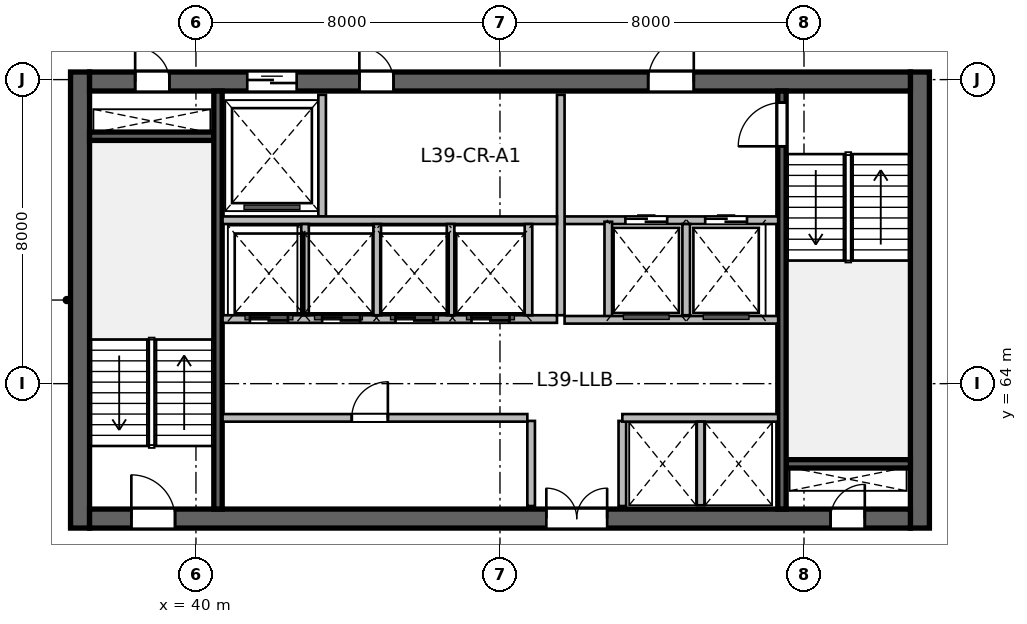
"""IFC4 building model, lengths in metres.
Left out: names, types, materials, properties, quantities, classifications, styles, units other than length and angle.
Written with IfcOpenShell. Run it as: python <this file> out.ifc"""

import sys

from ifc_helpers import new_model, si_unit, direction, frame, frame_2d, origin, place, context, subcontext, project, spatial, rectangle, extrude, source, transform, mapped, element, fill, save


model = new_model("IFC4")
c1 = context("Model", 3, precision=1e-05, world=origin(), true_north=direction((0.0, 1.0)))
c2 = subcontext(c1, "Body", "Model", "MODEL_VIEW")
j1 = project(units=[si_unit("LENGTHUNIT", "METRE"), si_unit("PLANEANGLEUNIT", "RADIAN")], contexts=[c1])
p1 = place(None, origin())
s1 = spatial("IfcSite", under=j1, at=p1, CompositionType="ELEMENT")
p2 = place(p1, origin())
s2 = spatial("IfcBuilding", under=s1, at=p2, CompositionType="ELEMENT")
p3 = place(p2, frame((0.0, 0.0, 162.3)))
s3 = spatial("IfcBuildingStorey", under=s2, at=p3, CompositionType="ELEMENT", Elevation=162.3)
m1 = source(origin(), c2, "Body", "SweptSolid", [
    extrude(rectangle(XDim=12.0, YDim=0.5, at=frame_2d((6.0, 0.0))), origin(), (0.0, 0.0, 1.0), 3.9),
])
for number, where, z_axis, x_axis in (
    (1, (36.95, 60.2, 0.0), (0.0, 0.0, 1.0), (0.0, 1.0, 0.0)),
    (2, (59.05, 60.2, 0.0), (0.0, 0.0, 1.0), (0.0, 1.0, 0.0)),
):
    element("IfcWall", number, at=place(p3, frame(where, z_axis=z_axis, x_axis=x_axis)), inside=s3, PredefinedType="SHEAR", context=c2, shape_type="MappedRepresentation", body=[
        mapped(m1, transform((0.0, 0.0, 0.0), scale=1.0)),
    ])
m2 = source(origin(), c2, "Body", "SweptSolid", [
    extrude(rectangle(XDim=21.6, YDim=0.5, at=frame_2d((10.8, 0.0))), origin(), (0.0, 0.0, 1.0), 3.9),
])
p4 = place(p3, frame((37.2, 60.45, 0.0), z_axis=(0.0, 0.0, 1.0), x_axis=(1.0, 0.0, 0.0)))
e3 = element("IfcWall", 3, at=p4, inside=s3, PredefinedType="SHEAR", context=c2, shape_type="MappedRepresentation", body=[
    mapped(m2, transform((0.0, 0.0, 0.0), scale=1.0)),
])
p5 = place(p4, frame((1.1, 0.0, 0.0)))
e4 = element("IfcOpeningElement", 4, at=p5, cuts=e3, PredefinedType="OPENING", context=c2, shape_type="SweptSolid", body=[
    extrude(rectangle(XDim=1.15, YDim=2.15, at=frame_2d((0.575, 1.075))), frame((0.0, 0.26, 0.0), z_axis=(0.0, -1.0, 0.0), x_axis=(1.0, 0.0, 0.0)), (0.0, 0.0, 1.0), 0.52),
])
p6 = place(p4, frame((19.5, 0.0, 0.0)))
e5 = element("IfcOpeningElement", 5, at=p6, cuts=e3, PredefinedType="OPENING", context=c2, shape_type="SweptSolid", body=[
    extrude(rectangle(XDim=0.9, YDim=2.1, at=frame_2d((0.45, 1.05))), frame((0.0, 0.26, 0.0), z_axis=(0.0, -1.0, 0.0), x_axis=(1.0, 0.0, 0.0)), (0.0, 0.0, 1.0), 0.52),
])
p7 = place(p4, frame((12.02, 0.0, 0.0)))
e6 = element("IfcOpeningElement", 6, at=p7, cuts=e3, PredefinedType="OPENING", context=c2, shape_type="SweptSolid", body=[
    extrude(rectangle(XDim=1.6, YDim=2.15, at=frame_2d((0.8, 1.075))), frame((0.0, 0.26, 0.0), z_axis=(0.0, -1.0, 0.0), x_axis=(1.0, 0.0, 0.0)), (0.0, 0.0, 1.0), 0.52),
])
p8 = place(p3, frame((37.2, 71.95, 0.0), z_axis=(0.0, 0.0, 1.0), x_axis=(1.0, 0.0, 0.0)))
e7 = element("IfcWall", 7, at=p8, inside=s3, PredefinedType="SHEAR", context=c2, shape_type="MappedRepresentation", body=[
    mapped(m2, transform((0.0, 0.0, 0.0), scale=1.0)),
])
p9 = place(p8, frame((1.2, 0.0, 0.0)))
e8 = element("IfcOpeningElement", 8, at=p9, cuts=e7, PredefinedType="OPENING", context=c2, shape_type="SweptSolid", body=[
    extrude(rectangle(XDim=0.9, YDim=2.1, at=frame_2d((0.45, 1.05))), frame((0.0, 0.26, 0.0), z_axis=(0.0, -1.0, 0.0), x_axis=(1.0, 0.0, 0.0)), (0.0, 0.0, 1.0), 0.52),
])
p10 = place(p8, frame((14.7, 0.0, 0.0)))
e9 = element("IfcOpeningElement", 9, at=p10, cuts=e7, PredefinedType="OPENING", context=c2, shape_type="SweptSolid", body=[
    extrude(rectangle(XDim=1.2, YDim=2.15, at=frame_2d((0.6, 1.075))), frame((0.0, 0.26, 0.0), z_axis=(0.0, -1.0, 0.0), x_axis=(1.0, 0.0, 0.0)), (0.0, 0.0, 1.0), 0.52),
])
p11 = place(p8, frame((4.15, 0.0, 0.0)))
e10 = element("IfcOpeningElement", 10, at=p11, cuts=e7, PredefinedType="OPENING", context=c2, shape_type="SweptSolid", body=[
    extrude(rectangle(XDim=1.3, YDim=2.15, at=frame_2d((0.65, 1.075))), frame((0.0, 0.26, 0.0), z_axis=(0.0, -1.0, 0.0), x_axis=(1.0, 0.0, 0.0)), (0.0, 0.0, 1.0), 0.52),
])
p12 = place(p8, frame((7.1, 0.0, 0.0)))
e11 = element("IfcOpeningElement", 11, at=p12, cuts=e7, PredefinedType="OPENING", context=c2, shape_type="SweptSolid", body=[
    extrude(rectangle(XDim=0.9, YDim=2.1, at=frame_2d((0.45, 1.05))), frame((0.0, 0.26, 0.0), z_axis=(0.0, -1.0, 0.0), x_axis=(1.0, 0.0, 0.0)), (0.0, 0.0, 1.0), 0.52),
])
m3 = source(origin(), c2, "Body", "SweptSolid", [
    extrude(rectangle(XDim=3.27, YDim=0.22, at=frame_2d((1.635, 0.0))), origin(), (0.0, 0.0, 1.0), 3.9),
])
for number, where, z_axis, x_axis in (
    (12, (37.2, 70.51, 0.0), (0.0, 0.0, 1.0), (1.0, 0.0, 0.0)),
    (13, (55.53, 61.89, 0.0), (0.0, 0.0, 1.0), (1.0, 0.0, 0.0)),
):
    element("IfcWall", number, at=place(p3, frame(where, z_axis=z_axis, x_axis=x_axis)), inside=s3, PredefinedType="SHEAR", context=c2, shape_type="MappedRepresentation", body=[
        mapped(m3, transform((0.0, 0.0, 0.0), scale=1.0)),
    ])
m4 = source(origin(), c2, "Body", "SweptSolid", [
    extrude(rectangle(XDim=11.0, YDim=0.22, at=frame_2d((5.5, 0.0))), origin(), (0.0, 0.0, 1.0), 3.9),
])
p13 = place(p3, frame((40.58, 60.7, 0.0), z_axis=(0.0, 0.0, 1.0), x_axis=(0.0, 1.0, 0.0)))
e14 = element("IfcWall", 14, at=p13, inside=s3, PredefinedType="SHEAR", context=c2, shape_type="MappedRepresentation", body=[
    mapped(m4, transform((0.0, 0.0, 0.0), scale=1.0)),
])
p14 = place(p3, frame((55.42, 60.7, 0.0), z_axis=(0.0, 0.0, 1.0), x_axis=(0.0, 1.0, 0.0)))
e15 = element("IfcWall", 15, at=p14, inside=s3, PredefinedType="SHEAR", context=c2, shape_type="MappedRepresentation", body=[
    mapped(m4, transform((0.0, 0.0, 0.0), scale=1.0)),
])
p15 = place(p14, frame((9.545, 0.0, 0.0)))
e16 = element("IfcOpeningElement", 16, at=p15, cuts=e15, PredefinedType="OPENING", context=c2, shape_type="SweptSolid", body=[
    extrude(rectangle(XDim=1.15, YDim=2.15, at=frame_2d((0.575, 1.075))), frame((0.0, 0.12, 0.0), z_axis=(0.0, -1.0, 0.0), x_axis=(1.0, 0.0, 0.0)), (0.0, 0.0, 1.0), 0.24),
])
m5 = source(origin(), c2, "Body", "SweptSolid", [
    extrude(rectangle(XDim=2.24, YDim=0.2, at=frame_2d((1.12, 0.0))), origin(), (0.0, 0.0, 1.0), 3.65),
])
for number, where, z_axis, x_axis in (
    (17, (48.82, 60.78, 0.0), (0.0, 0.0, 1.0), (0.0, 1.0, 0.0)),
    (18, (51.22, 60.78, 0.0), (0.0, 0.0, 1.0), (0.0, 1.0, 0.0)),
):
    element("IfcWall", number, at=place(p3, frame(where, z_axis=z_axis, x_axis=x_axis)), inside=s3, PredefinedType="SOLIDWALL", context=c2, shape_type="MappedRepresentation", body=[
        mapped(m5, transform((0.0, 0.0, 0.0), scale=1.0)),
    ])
m6 = source(origin(), c2, "Body", "SweptSolid", [
    extrude(rectangle(XDim=5.62, YDim=0.2, at=frame_2d((2.81, 0.0))), origin(), (0.0, 0.0, 1.0), 3.65),
])
p16 = place(p3, frame((49.7, 68.3, 0.0), z_axis=(0.0, 0.0, 1.0), x_axis=(1.0, 0.0, 0.0)))
e19 = element("IfcWall", 19, at=p16, inside=s3, PredefinedType="SOLIDWALL", context=c2, shape_type="MappedRepresentation", body=[
    mapped(m6, transform((0.0, 0.0, 0.0), scale=1.0)),
])
p17 = place(p16, frame((1.6, 0.0, 0.0)))
e20 = element("IfcOpeningElement", 20, at=p17, cuts=e19, PredefinedType="OPENING", context=c2, shape_type="SweptSolid", body=[
    extrude(rectangle(XDim=1.1, YDim=2.15, at=frame_2d((0.55, 1.075))), frame((0.0, 0.11, 0.0), z_axis=(0.0, -1.0, 0.0), x_axis=(1.0, 0.0, 0.0)), (0.0, 0.0, 1.0), 0.22),
])
p18 = place(p16, frame((3.7, 0.0, 0.0)))
e21 = element("IfcOpeningElement", 21, at=p18, cuts=e19, PredefinedType="OPENING", context=c2, shape_type="SweptSolid", body=[
    extrude(rectangle(XDim=1.1, YDim=2.15, at=frame_2d((0.55, 1.075))), frame((0.0, 0.11, 0.0), z_axis=(0.0, -1.0, 0.0), x_axis=(1.0, 0.0, 0.0)), (0.0, 0.0, 1.0), 0.22),
])
m7 = source(origin(), c2, "Body", "SweptSolid", [
    extrude(rectangle(XDim=5.8, YDim=0.2, at=frame_2d((2.9, 0.0))), origin(), (0.0, 0.0, 1.0), 3.65),
])
p19 = place(p3, frame((49.6, 65.8, 0.0), z_axis=(0.0, 0.0, 1.0), x_axis=(0.0, 1.0, 0.0)))
e22 = element("IfcWall", 22, at=p19, inside=s3, PredefinedType="SOLIDWALL", context=c2, shape_type="MappedRepresentation", body=[
    mapped(m7, transform((0.0, 0.0, 0.0), scale=1.0)),
])
m8 = source(origin(), c2, "Body", "SweptSolid", [
    extrude(rectangle(XDim=2.58, YDim=0.2, at=frame_2d((1.29, 0.0))), origin(), (0.0, 0.0, 1.0), 3.65),
])
p20 = place(p3, frame((50.85, 65.68, 0.0), z_axis=(0.0, 0.0, 1.0), x_axis=(0.0, 1.0, 0.0)))
e23 = element("IfcWall", 23, at=p20, inside=s3, PredefinedType="SOLIDWALL", context=c2, shape_type="MappedRepresentation", body=[
    mapped(m8, transform((0.0, 0.0, 0.0), scale=1.0)),
])
m9 = source(origin(), c2, "Body", "SweptSolid", [
    extrude(rectangle(XDim=2.4, YDim=0.2, at=frame_2d((1.2, 0.0))), origin(), (0.0, 0.0, 1.0), 3.65),
])
p21 = place(p3, frame((52.9, 65.8, 0.0), z_axis=(0.0, 0.0, 1.0), x_axis=(0.0, 1.0, 0.0)))
e24 = element("IfcWall", 24, at=p21, inside=s3, PredefinedType="SOLIDWALL", context=c2, shape_type="MappedRepresentation", body=[
    mapped(m9, transform((0.0, 0.0, 0.0), scale=1.0)),
])
p22 = place(p3, frame((49.7, 65.68, 0.0), z_axis=(0.0, 0.0, 1.0), x_axis=(1.0, 0.0, 0.0)))
e25 = element("IfcWall", 25, at=p22, inside=s3, PredefinedType="SOLIDWALL", context=c2, shape_type="MappedRepresentation", body=[
    mapped(m6, transform((0.0, 0.0, 0.0), scale=1.0)),
])
m10 = source(origin(), c2, "Body", "SweptSolid", [
    extrude(rectangle(XDim=3.2, YDim=0.2, at=frame_2d((1.6, 0.0))), origin(), (0.0, 0.0, 1.0), 3.65),
])
p23 = place(p3, frame((43.32, 68.4, 0.0), z_axis=(0.0, 0.0, 1.0), x_axis=(0.0, 1.0, 0.0)))
e26 = element("IfcWall", 26, at=p23, inside=s3, PredefinedType="SOLIDWALL", context=c2, shape_type="MappedRepresentation", body=[
    mapped(m10, transform((0.0, 0.0, 0.0), scale=1.0)),
])
m11 = source(origin(), c2, "Body", "SweptSolid", [
    extrude(rectangle(XDim=8.8, YDim=0.2, at=frame_2d((4.4, 0.0))), origin(), (0.0, 0.0, 1.0), 3.65),
])
p24 = place(p3, frame((40.7, 68.3, 0.0), z_axis=(0.0, 0.0, 1.0), x_axis=(1.0, 0.0, 0.0)))
e27 = element("IfcWall", 27, at=p24, inside=s3, PredefinedType="SOLIDWALL", context=c2, shape_type="MappedRepresentation", body=[
    mapped(m11, transform((0.0, 0.0, 0.0), scale=1.0)),
])
m12 = source(origin(), c2, "Body", "SweptSolid", [
    extrude(rectangle(XDim=8.02, YDim=0.2, at=frame_2d((4.01, 0.0))), origin(), (0.0, 0.0, 1.0), 3.65),
])
p25 = place(p3, frame((40.7, 63.1, 0.0), z_axis=(0.0, 0.0, 1.0), x_axis=(1.0, 0.0, 0.0)))
e28 = element("IfcWall", 28, at=p25, inside=s3, PredefinedType="SOLIDWALL", context=c2, shape_type="MappedRepresentation", body=[
    mapped(m12, transform((0.0, 0.0, 0.0), scale=1.0)),
])
p26 = place(p25, frame((3.4, 0.0, 0.0)))
e29 = element("IfcOpeningElement", 29, at=p26, cuts=e28, PredefinedType="OPENING", context=c2, shape_type="SweptSolid", body=[
    extrude(rectangle(XDim=0.95, YDim=2.15, at=frame_2d((0.475, 1.075))), frame((0.0, 0.11, 0.0), z_axis=(0.0, -1.0, 0.0), x_axis=(1.0, 0.0, 0.0)), (0.0, 0.0, 1.0), 0.22),
])
m13 = source(origin(), c2, "Body", "SweptSolid", [
    extrude(rectangle(XDim=4.1, YDim=0.2, at=frame_2d((2.05, 0.0))), origin(), (0.0, 0.0, 1.0), 3.65),
])
p27 = place(p3, frame((51.22, 63.1, 0.0), z_axis=(0.0, 0.0, 1.0), x_axis=(1.0, 0.0, 0.0)))
e30 = element("IfcWall", 30, at=p27, inside=s3, PredefinedType="SOLIDWALL", context=c2, shape_type="MappedRepresentation", body=[
    mapped(m13, transform((0.0, 0.0, 0.0), scale=1.0)),
])
m14 = source(origin(), c2, "Body", "SweptSolid", [
    extrude(rectangle(XDim=2.2, YDim=0.2, at=frame_2d((1.1, 0.0))), origin(), (0.0, 0.0, 1.0), 3.65),
])
p28 = place(p3, frame((53.28, 60.8, 0.0), z_axis=(0.0, 0.0, 1.0), x_axis=(0.0, 1.0, 0.0)))
e31 = element("IfcWall", 31, at=p28, inside=s3, PredefinedType="SOLIDWALL", context=c2, shape_type="MappedRepresentation", body=[
    mapped(m14, transform((0.0, 0.0, 0.0), scale=1.0)),
])
p29 = place(p3, frame((40.7, 65.7, 0.0), z_axis=(0.0, 0.0, 1.0), x_axis=(1.0, 0.0, 0.0)))
e32 = element("IfcWall", 32, at=p29, inside=s3, PredefinedType="SOLIDWALL", context=c2, shape_type="MappedRepresentation", body=[
    mapped(m11, transform((0.0, 0.0, 0.0), scale=1.0)),
])
p30 = place(p29, frame((0.72, 0.0, 0.0)))
e33 = element("IfcOpeningElement", 33, at=p30, cuts=e32, PredefinedType="OPENING", context=c2, shape_type="SweptSolid", body=[
    extrude(rectangle(XDim=1.0, YDim=2.15, at=frame_2d((0.5, 1.075))), frame((0.0, 0.11, 0.0), z_axis=(0.0, -1.0, 0.0), x_axis=(1.0, 0.0, 0.0)), (0.0, 0.0, 1.0), 0.22),
])
p31 = place(p29, frame((2.62, 0.0, 0.0)))
e34 = element("IfcOpeningElement", 34, at=p31, cuts=e32, PredefinedType="OPENING", context=c2, shape_type="SweptSolid", body=[
    extrude(rectangle(XDim=1.0, YDim=2.15, at=frame_2d((0.5, 1.075))), frame((0.0, 0.11, 0.0), z_axis=(0.0, -1.0, 0.0), x_axis=(1.0, 0.0, 0.0)), (0.0, 0.0, 1.0), 0.22),
])
p32 = place(p29, frame((4.55, 0.0, 0.0)))
e35 = element("IfcOpeningElement", 35, at=p32, cuts=e32, PredefinedType="OPENING", context=c2, shape_type="SweptSolid", body=[
    extrude(rectangle(XDim=1.0, YDim=2.15, at=frame_2d((0.5, 1.075))), frame((0.0, 0.11, 0.0), z_axis=(0.0, -1.0, 0.0), x_axis=(1.0, 0.0, 0.0)), (0.0, 0.0, 1.0), 0.22),
])
p33 = place(p29, frame((6.55, 0.0, 0.0)))
e36 = element("IfcOpeningElement", 36, at=p33, cuts=e32, PredefinedType="OPENING", context=c2, shape_type="SweptSolid", body=[
    extrude(rectangle(XDim=1.0, YDim=2.15, at=frame_2d((0.5, 1.075))), frame((0.0, 0.11, 0.0), z_axis=(0.0, -1.0, 0.0), x_axis=(1.0, 0.0, 0.0)), (0.0, 0.0, 1.0), 0.22),
])
for number, where, z_axis, x_axis in (
    (37, (48.75, 65.8, 0.0), (0.0, 0.0, 1.0), (0.0, 1.0, 0.0)),
    (38, (42.87, 65.8, 0.0), (0.0, 0.0, 1.0), (0.0, 1.0, 0.0)),
    (39, (44.77, 65.8, 0.0), (0.0, 0.0, 1.0), (0.0, 1.0, 0.0)),
    (40, (46.7, 65.8, 0.0), (0.0, 0.0, 1.0), (0.0, 1.0, 0.0)),
):
    element("IfcWall", number, at=place(p3, frame(where, z_axis=z_axis, x_axis=x_axis)), inside=s3, PredefinedType="SOLIDWALL", context=c2, shape_type="MappedRepresentation", body=[
        mapped(m9, transform((0.0, 0.0, 0.0), scale=1.0)),
    ])
m15 = source(origin(), c2, "Body", "SweptSolid", [
    extrude(rectangle(XDim=1.15, YDim=2.15, at=frame_2d((0.575, 1.075))), frame((0.0, 0.025, 0.0), z_axis=(0.0, -1.0, 0.0), x_axis=(1.0, 0.0, 0.0)), (0.0, 0.0, 1.0), 0.05),
])
p34 = place(p5, origin())
e41 = element("IfcDoor", 41, at=p34, inside=s3, OperationType="SINGLE_SWING_LEFT", PredefinedType="DOOR", context=c2, shape_type="MappedRepresentation", body=[
    mapped(m15, transform((0.0, 0.0, 0.0), scale=1.0)),
])
fill(e4, e41)
m16 = source(origin(), c2, "Body", "SweptSolid", [
    extrude(rectangle(XDim=0.9, YDim=2.1, at=frame_2d((0.45, 1.05))), frame((0.0, 0.025, 0.0), z_axis=(0.0, -1.0, 0.0), x_axis=(1.0, 0.0, 0.0)), (0.0, 0.0, 1.0), 0.05),
])
p35 = place(p9, origin())
e42 = element("IfcDoor", 42, at=p35, inside=s3, OperationType="SINGLE_SWING_LEFT", PredefinedType="DOOR", context=c2, shape_type="MappedRepresentation", body=[
    mapped(m16, transform((0.0, 0.0, 0.0), scale=1.0)),
])
fill(e8, e42)
p36 = place(p6, origin())
e43 = element("IfcDoor", 43, at=p36, inside=s3, OperationType="SINGLE_SWING_RIGHT", PredefinedType="DOOR", context=c2, shape_type="MappedRepresentation", body=[
    mapped(m16, transform((0.0, 0.0, 0.0), scale=1.0)),
])
fill(e5, e43)
p37 = place(p15, origin())
e44 = element("IfcDoor", 44, at=p37, inside=s3, OperationType="SINGLE_SWING_LEFT", PredefinedType="DOOR", context=c2, shape_type="MappedRepresentation", body=[
    mapped(m15, transform((0.0, 0.0, 0.0), scale=1.0)),
])
fill(e16, e44)
m17 = source(origin(), c2, "Body", "SweptSolid", [
    extrude(rectangle(XDim=1.6, YDim=2.15, at=frame_2d((0.8, 1.075))), frame((0.0, 0.025, 0.0), z_axis=(0.0, -1.0, 0.0), x_axis=(1.0, 0.0, 0.0)), (0.0, 0.0, 1.0), 0.05),
])
p38 = place(p7, origin())
e45 = element("IfcDoor", 45, at=p38, inside=s3, OperationType="DOUBLE_DOOR_SINGLE_SWING", PredefinedType="DOOR", context=c2, shape_type="MappedRepresentation", body=[
    mapped(m17, transform((0.0, 0.0, 0.0), scale=1.0)),
])
fill(e6, e45)
m18 = source(origin(), c2, "Body", "SweptSolid", [
    extrude(rectangle(XDim=1.2, YDim=2.15, at=frame_2d((0.6, 1.075))), frame((0.0, 0.025, 0.0), z_axis=(0.0, -1.0, 0.0), x_axis=(1.0, 0.0, 0.0)), (0.0, 0.0, 1.0), 0.05),
])
p39 = place(p10, origin())
e46 = element("IfcDoor", 46, at=p39, inside=s3, OperationType="SINGLE_SWING_RIGHT", PredefinedType="DOOR", context=c2, shape_type="MappedRepresentation", body=[
    mapped(m18, transform((0.0, 0.0, 0.0), scale=1.0)),
])
fill(e9, e46)
m19 = source(origin(), c2, "Body", "SweptSolid", [
    extrude(rectangle(XDim=1.1, YDim=2.15, at=frame_2d((0.55, 1.075))), frame((0.0, 0.025, 0.0), z_axis=(0.0, -1.0, 0.0), x_axis=(1.0, 0.0, 0.0)), (0.0, 0.0, 1.0), 0.05),
])
p40 = place(p17, origin())
e47 = element("IfcDoor", 47, at=p40, inside=s3, OperationType="DOUBLE_DOOR_SLIDING", PredefinedType="DOOR", context=c2, shape_type="MappedRepresentation", body=[
    mapped(m19, transform((0.0, 0.0, 0.0), scale=1.0)),
])
fill(e20, e47)
p41 = place(p18, origin())
e48 = element("IfcDoor", 48, at=p41, inside=s3, OperationType="DOUBLE_DOOR_SLIDING", PredefinedType="DOOR", context=c2, shape_type="MappedRepresentation", body=[
    mapped(m19, transform((0.0, 0.0, 0.0), scale=1.0)),
])
fill(e21, e48)
m20 = source(origin(), c2, "Body", "SweptSolid", [
    extrude(rectangle(XDim=1.3, YDim=2.15, at=frame_2d((0.65, 1.075))), frame((0.0, 0.025, 0.0), z_axis=(0.0, -1.0, 0.0), x_axis=(1.0, 0.0, 0.0)), (0.0, 0.0, 1.0), 0.05),
])
p42 = place(p11, origin())
e49 = element("IfcDoor", 49, at=p42, inside=s3, OperationType="DOUBLE_DOOR_SLIDING", PredefinedType="DOOR", context=c2, shape_type="MappedRepresentation", body=[
    mapped(m20, transform((0.0, 0.0, 0.0), scale=1.0)),
])
fill(e10, e49)
p43 = place(p12, origin())
e50 = element("IfcDoor", 50, at=p43, inside=s3, OperationType="SINGLE_SWING_LEFT", PredefinedType="DOOR", context=c2, shape_type="MappedRepresentation", body=[
    mapped(m16, transform((0.0, 0.0, 0.0), scale=1.0)),
])
fill(e11, e50)
m21 = source(origin(), c2, "Body", "SweptSolid", [
    extrude(rectangle(XDim=0.95, YDim=2.15, at=frame_2d((0.475, 1.075))), frame((0.0, 0.025, 0.0), z_axis=(0.0, -1.0, 0.0), x_axis=(1.0, 0.0, 0.0)), (0.0, 0.0, 1.0), 0.05),
])
p44 = place(p26, origin())
e51 = element("IfcDoor", 51, at=p44, inside=s3, OperationType="SINGLE_SWING_RIGHT", PredefinedType="DOOR", context=c2, shape_type="MappedRepresentation", body=[
    mapped(m21, transform((0.0, 0.0, 0.0), scale=1.0)),
])
fill(e29, e51)
m22 = source(origin(), c2, "Body", "SweptSolid", [
    extrude(rectangle(XDim=1.0, YDim=2.15, at=frame_2d((0.5, 1.075))), frame((0.0, 0.025, 0.0), z_axis=(0.0, -1.0, 0.0), x_axis=(1.0, 0.0, 0.0)), (0.0, 0.0, 1.0), 0.05),
])
p45 = place(p30, origin())
e52 = element("IfcDoor", 52, at=p45, inside=s3, OperationType="DOUBLE_DOOR_SLIDING", PredefinedType="DOOR", context=c2, shape_type="MappedRepresentation", body=[
    mapped(m22, transform((0.0, 0.0, 0.0), scale=1.0)),
])
fill(e33, e52)
p46 = place(p31, origin())
e53 = element("IfcDoor", 53, at=p46, inside=s3, OperationType="DOUBLE_DOOR_SLIDING", PredefinedType="DOOR", context=c2, shape_type="MappedRepresentation", body=[
    mapped(m22, transform((0.0, 0.0, 0.0), scale=1.0)),
])
fill(e34, e53)
p47 = place(p32, origin())
e54 = element("IfcDoor", 54, at=p47, inside=s3, OperationType="DOUBLE_DOOR_SLIDING", PredefinedType="DOOR", context=c2, shape_type="MappedRepresentation", body=[
    mapped(m22, transform((0.0, 0.0, 0.0), scale=1.0)),
])
fill(e35, e54)
p48 = place(p33, origin())
e55 = element("IfcDoor", 55, at=p48, inside=s3, OperationType="DOUBLE_DOOR_SLIDING", PredefinedType="DOOR", context=c2, shape_type="MappedRepresentation", body=[
    mapped(m22, transform((0.0, 0.0, 0.0), scale=1.0)),
])
fill(e36, e55)
save(model, sys.argv[1])
